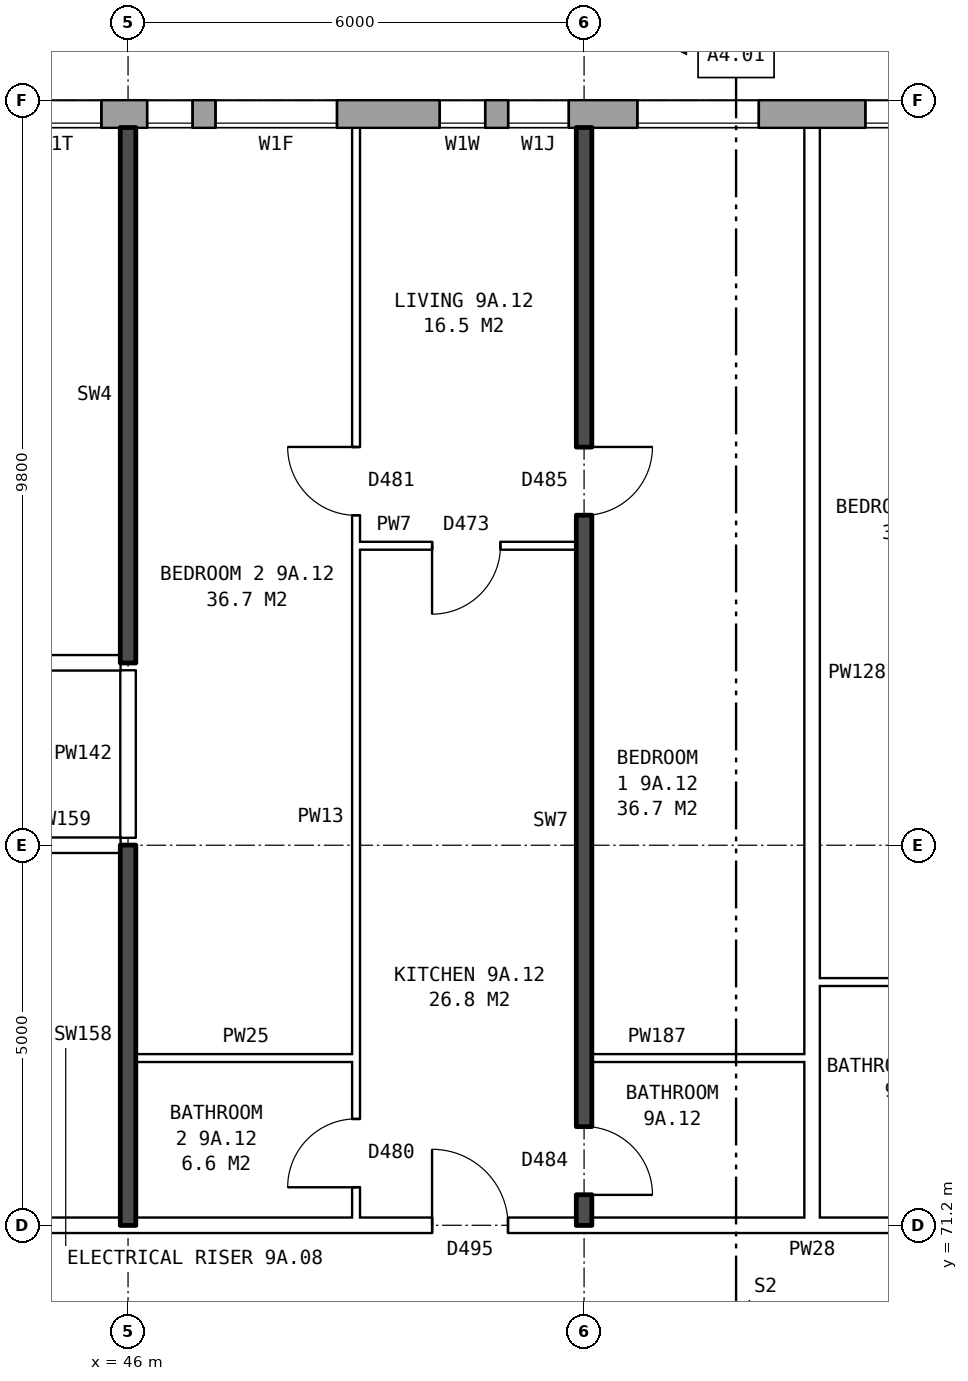
"""IFC4 building model, lengths in metres.
Left out: names, types, materials, properties, quantities, classifications, styles, units other than length and angle.
Written with IfcOpenShell. Run it as: python <this file> out.ifc"""

import sys

from ifc_helpers import new_model, si_unit, direction, frame, frame_2d, origin, place, context, subcontext, project, spatial, rectangle, extrude, element, fill, save


model = new_model("IFC4")
c1 = context("Model", 3, precision=1e-05, world=origin(), true_north=direction((0.0, 1.0)))
c2 = subcontext(c1, "Body", "Model", "MODEL_VIEW")
j1 = project(units=[si_unit("LENGTHUNIT", "METRE"), si_unit("PLANEANGLEUNIT", "RADIAN")], contexts=[c1])
p1 = place(None, origin())
s1 = spatial("IfcSite", under=j1, at=p1, CompositionType="ELEMENT")
p2 = place(p1, origin())
s2 = spatial("IfcBuilding", under=s1, at=p2, CompositionType="ELEMENT")
p3 = place(p2, frame((0.0, 0.0, 35.0)))
s3 = spatial("IfcBuildingStorey", under=s2, at=p3, CompositionType="ELEMENT", Elevation=35.0)
p4 = place(p3, frame((72.925, 85.82, 0.0), z_axis=(0.0, 0.0, 1.0), x_axis=(-1.0, 0.0, 0.0)))
e1 = element("IfcWall", 1, at=p4, inside=s3, PredefinedType="STANDARD", context=c2, shape_type="SweptSolid", body=[
    extrude(rectangle(XDim=50.101, YDim=0.36, at=frame_2d((25.05, 0.0))), origin(), (0.0, 0.0, 1.0), 2.85),
])
p5 = place(p4, frame((0.625, 0.0, 0.8)))
e2 = element("IfcOpeningElement", 2, at=p5, cuts=e1, PredefinedType="OPENING", context=c2, shape_type="SweptSolid", body=[
    extrude(rectangle(XDim=1.6, YDim=1.8, at=frame_2d((0.8, 0.9))), frame((0.0, 0.19, 0.0), z_axis=(0.0, -1.0, 0.0), x_axis=(1.0, 0.0, 0.0)), (0.0, 0.0, 1.0), 0.38),
])
p6 = place(p4, frame((3.625, 0.0, 0.8)))
e3 = element("IfcOpeningElement", 3, at=p6, cuts=e1, PredefinedType="OPENING", context=c2, shape_type="SweptSolid", body=[
    extrude(rectangle(XDim=1.6, YDim=1.8, at=frame_2d((0.8, 0.9))), frame((0.0, 0.19, 0.0), z_axis=(0.0, -1.0, 0.0), x_axis=(1.0, 0.0, 0.0)), (0.0, 0.0, 1.0), 0.38),
])
p7 = place(p4, frame((6.625, 0.0, 0.8)))
e4 = element("IfcOpeningElement", 4, at=p7, cuts=e1, PredefinedType="OPENING", context=c2, shape_type="SweptSolid", body=[
    extrude(rectangle(XDim=1.6, YDim=1.8, at=frame_2d((0.8, 0.9))), frame((0.0, 0.19, 0.0), z_axis=(0.0, -1.0, 0.0), x_axis=(1.0, 0.0, 0.0)), (0.0, 0.0, 1.0), 0.38),
])
p8 = place(p4, frame((9.625, 0.0, 0.8)))
e5 = element("IfcOpeningElement", 5, at=p8, cuts=e1, PredefinedType="OPENING", context=c2, shape_type="SweptSolid", body=[
    extrude(rectangle(XDim=1.6, YDim=1.8, at=frame_2d((0.8, 0.9))), frame((0.0, 0.19, 0.0), z_axis=(0.0, -1.0, 0.0), x_axis=(1.0, 0.0, 0.0)), (0.0, 0.0, 1.0), 0.38),
])
p9 = place(p4, frame((12.625, 0.0, 0.8)))
e6 = element("IfcOpeningElement", 6, at=p9, cuts=e1, PredefinedType="OPENING", context=c2, shape_type="SweptSolid", body=[
    extrude(rectangle(XDim=1.6, YDim=1.8, at=frame_2d((0.8, 0.9))), frame((0.0, 0.19, 0.0), z_axis=(0.0, -1.0, 0.0), x_axis=(1.0, 0.0, 0.0)), (0.0, 0.0, 1.0), 0.38),
])
p10 = place(p4, frame((15.625, 0.0, 0.8)))
e7 = element("IfcOpeningElement", 7, at=p10, cuts=e1, PredefinedType="OPENING", context=c2, shape_type="SweptSolid", body=[
    extrude(rectangle(XDim=1.6, YDim=1.8, at=frame_2d((0.8, 0.9))), frame((0.0, 0.19, 0.0), z_axis=(0.0, -1.0, 0.0), x_axis=(1.0, 0.0, 0.0)), (0.0, 0.0, 1.0), 0.38),
])
p11 = place(p4, frame((18.625, 0.0, 0.8)))
e8 = element("IfcOpeningElement", 8, at=p11, cuts=e1, PredefinedType="OPENING", context=c2, shape_type="SweptSolid", body=[
    extrude(rectangle(XDim=1.6, YDim=1.8, at=frame_2d((0.8, 0.9))), frame((0.0, 0.19, 0.0), z_axis=(0.0, -1.0, 0.0), x_axis=(1.0, 0.0, 0.0)), (0.0, 0.0, 1.0), 0.38),
])
p12 = place(p4, frame((21.125, 0.0, 1.1)))
e9 = element("IfcOpeningElement", 9, at=p12, cuts=e1, PredefinedType="OPENING", context=c2, shape_type="SweptSolid", body=[
    extrude(rectangle(XDim=0.8, YDim=1.5, at=frame_2d((0.4, 0.75))), frame((0.0, 0.19, 0.0), z_axis=(0.0, -1.0, 0.0), x_axis=(1.0, 0.0, 0.0)), (0.0, 0.0, 1.0), 0.38),
])
p13 = place(p4, frame((24.175, 0.0, 0.15)))
e10 = element("IfcOpeningElement", 10, at=p13, cuts=e1, PredefinedType="OPENING", context=c2, shape_type="SweptSolid", body=[
    extrude(rectangle(XDim=1.6, YDim=1.5, at=frame_2d((0.8, 0.75))), frame((0.0, 0.19, 0.0), z_axis=(0.0, -1.0, 0.0), x_axis=(1.0, 0.0, 0.0)), (0.0, 0.0, 1.0), 0.38),
])
p14 = place(p4, frame((27.275, 0.0, 1.7)))
e11 = element("IfcOpeningElement", 11, at=p14, cuts=e1, PredefinedType="OPENING", context=c2, shape_type="SweptSolid", body=[
    extrude(rectangle(XDim=1.2, YDim=0.9, at=frame_2d((0.6, 0.45))), frame((0.0, 0.19, 0.0), z_axis=(0.0, -1.0, 0.0), x_axis=(1.0, 0.0, 0.0)), (0.0, 0.0, 1.0), 0.38),
])
p15 = place(p4, frame((30.625, 0.0, 0.8)))
e12 = element("IfcOpeningElement", 12, at=p15, cuts=e1, PredefinedType="OPENING", context=c2, shape_type="SweptSolid", body=[
    extrude(rectangle(XDim=1.6, YDim=1.8, at=frame_2d((0.8, 0.9))), frame((0.0, 0.19, 0.0), z_axis=(0.0, -1.0, 0.0), x_axis=(1.0, 0.0, 0.0)), (0.0, 0.0, 1.0), 0.38),
])
p16 = place(p4, frame((33.625, 0.0, 0.8)))
e13 = element("IfcOpeningElement", 13, at=p16, cuts=e1, PredefinedType="OPENING", context=c2, shape_type="SweptSolid", body=[
    extrude(rectangle(XDim=1.6, YDim=1.8, at=frame_2d((0.8, 0.9))), frame((0.0, 0.19, 0.0), z_axis=(0.0, -1.0, 0.0), x_axis=(1.0, 0.0, 0.0)), (0.0, 0.0, 1.0), 0.38),
])
p17 = place(p4, frame((36.625, 0.0, 0.8)))
e14 = element("IfcOpeningElement", 14, at=p17, cuts=e1, PredefinedType="OPENING", context=c2, shape_type="SweptSolid", body=[
    extrude(rectangle(XDim=1.6, YDim=1.8, at=frame_2d((0.8, 0.9))), frame((0.0, 0.19, 0.0), z_axis=(0.0, -1.0, 0.0), x_axis=(1.0, 0.0, 0.0)), (0.0, 0.0, 1.0), 0.38),
])
p18 = place(p4, frame((39.625, 0.0, 0.8)))
e15 = element("IfcOpeningElement", 15, at=p18, cuts=e1, PredefinedType="OPENING", context=c2, shape_type="SweptSolid", body=[
    extrude(rectangle(XDim=1.6, YDim=1.8, at=frame_2d((0.8, 0.9))), frame((0.0, 0.19, 0.0), z_axis=(0.0, -1.0, 0.0), x_axis=(1.0, 0.0, 0.0)), (0.0, 0.0, 1.0), 0.38),
])
p19 = place(p4, frame((42.625, 0.0, 0.8)))
e16 = element("IfcOpeningElement", 16, at=p19, cuts=e1, PredefinedType="OPENING", context=c2, shape_type="SweptSolid", body=[
    extrude(rectangle(XDim=1.6, YDim=1.8, at=frame_2d((0.8, 0.9))), frame((0.0, 0.19, 0.0), z_axis=(0.0, -1.0, 0.0), x_axis=(1.0, 0.0, 0.0)), (0.0, 0.0, 1.0), 0.38),
])
p20 = place(p4, frame((45.625, 0.0, 0.8)))
e17 = element("IfcOpeningElement", 17, at=p20, cuts=e1, PredefinedType="OPENING", context=c2, shape_type="SweptSolid", body=[
    extrude(rectangle(XDim=1.6, YDim=1.8, at=frame_2d((0.8, 0.9))), frame((0.0, 0.19, 0.0), z_axis=(0.0, -1.0, 0.0), x_axis=(1.0, 0.0, 0.0)), (0.0, 0.0, 1.0), 0.38),
])
p21 = place(p4, frame((22.225, 0.0, 1.7)))
e18 = element("IfcOpeningElement", 18, at=p21, cuts=e1, PredefinedType="OPENING", context=c2, shape_type="SweptSolid", body=[
    extrude(rectangle(XDim=0.6, YDim=0.9, at=frame_2d((0.3, 0.45))), frame((0.0, 0.19, 0.0), z_axis=(0.0, -1.0, 0.0), x_axis=(1.0, 0.0, 0.0)), (0.0, 0.0, 1.0), 0.38),
])
p22 = place(p4, frame((26.075, 0.0, 0.25)))
e19 = element("IfcOpeningElement", 19, at=p22, cuts=e1, PredefinedType="OPENING", context=c2, shape_type="SweptSolid", body=[
    extrude(rectangle(XDim=0.6, YDim=0.9, at=frame_2d((0.3, 0.45))), frame((0.0, 0.19, 0.0), z_axis=(0.0, -1.0, 0.0), x_axis=(1.0, 0.0, 0.0)), (0.0, 0.0, 1.0), 0.38),
])
p23 = place(p4, frame((28.775, 0.0, 0.8)))
e20 = element("IfcOpeningElement", 20, at=p23, cuts=e1, PredefinedType="OPENING", context=c2, shape_type="SweptSolid", body=[
    extrude(rectangle(XDim=1.4, YDim=1.8, at=frame_2d((0.7, 0.9))), frame((0.0, 0.19, 0.0), z_axis=(0.0, -1.0, 0.0), x_axis=(1.0, 0.0, 0.0)), (0.0, 0.0, 1.0), 0.38),
])
p24 = place(p3, frame((44.36, 71.2, 0.0), z_axis=(0.0, 0.0, 1.0), x_axis=(1.0, 0.0, 0.0)))
e21 = element("IfcWall", 21, at=p24, inside=s3, PredefinedType="PARTITIONING", context=c2, shape_type="SweptSolid", body=[
    extrude(rectangle(XDim=19.28, YDim=0.2, at=frame_2d((9.64, 0.0))), origin(), (0.0, 0.0, 1.0), 2.85),
])
p25 = place(p24, frame((14.64, 0.0, 0.0)))
e22 = element("IfcOpeningElement", 22, at=p25, cuts=e21, PredefinedType="OPENING", context=c2, shape_type="SweptSolid", body=[
    extrude(rectangle(XDim=1.0, YDim=2.1, at=frame_2d((0.5, 1.05))), frame((0.0, 0.11, 0.0), z_axis=(0.0, -1.0, 0.0), x_axis=(1.0, 0.0, 0.0)), (0.0, 0.0, 1.0), 0.22),
])
p26 = place(p24, frame((5.64, 0.0, 0.0)))
e23 = element("IfcOpeningElement", 23, at=p26, cuts=e21, PredefinedType="OPENING", context=c2, shape_type="SweptSolid", body=[
    extrude(rectangle(XDim=1.0, YDim=2.1, at=frame_2d((0.5, 1.05))), frame((0.0, 0.11, 0.0), z_axis=(0.0, -1.0, 0.0), x_axis=(1.0, 0.0, 0.0)), (0.0, 0.0, 1.0), 0.22),
])
p27 = place(p3, frame((46.1, 73.4, 0.0), z_axis=(0.0, 0.0, 1.0), x_axis=(1.0, 0.0, 0.0)))
e24 = element("IfcWall", 24, at=p27, inside=s3, PredefinedType="PARTITIONING", context=c2, shape_type="SweptSolid", body=[
    extrude(rectangle(XDim=2.9, YDim=0.1, at=frame_2d((1.45, 0.0))), origin(), (0.0, 0.0, 1.0), 2.85),
])
for number, where, z_axis, x_axis in (
    (25, (52.1, 73.4, 0.0), (0.0, 0.0, 1.0), (1.0, 0.0, 0.0)),
    (26, (55.1, 74.4, 0.0), (0.0, 0.0, 1.0), (1.0, 0.0, 0.0)),
):
    element("IfcWall", number, at=place(p3, frame(where, z_axis=z_axis, x_axis=x_axis)), inside=s3, PredefinedType="PARTITIONING", context=c2, shape_type="SweptSolid", body=[
        extrude(rectangle(XDim=2.8, YDim=0.1, at=frame_2d((1.4, 0.0))), origin(), (0.0, 0.0, 1.0), 2.85),
    ])
p28 = place(p3, frame((44.36, 76.2, 0.0), z_axis=(0.0, 0.0, 1.0), x_axis=(1.0, 0.0, 0.0)))
e27 = element("IfcWall", 27, at=p28, inside=s3, PredefinedType="PARTITIONING", context=c2, shape_type="SweptSolid", body=[
    extrude(rectangle(XDim=1.54, YDim=0.2, at=frame_2d((0.77, 0.0))), origin(), (0.0, 0.0, 1.0), 2.85),
])
p29 = place(p3, frame((20.11, 78.6, 0.0), z_axis=(0.0, 0.0, 1.0), x_axis=(1.0, 0.0, 0.0)))
e28 = element("IfcWall", 28, at=p29, inside=s3, PredefinedType="PARTITIONING", context=c2, shape_type="SweptSolid", body=[
    extrude(rectangle(XDim=25.79, YDim=0.2, at=frame_2d((12.895, 0.0))), origin(), (0.0, 0.0, 1.0), 2.85),
])
p30 = place(p29, frame((22.34, 0.0, 0.0)))
e29 = element("IfcOpeningElement", 29, at=p30, cuts=e28, PredefinedType="OPENING", context=c2, shape_type="SweptSolid", body=[
    extrude(rectangle(XDim=1.0, YDim=2.1, at=frame_2d((0.5, 1.05))), frame((0.0, 0.11, 0.0), z_axis=(0.0, -1.0, 0.0), x_axis=(1.0, 0.0, 0.0)), (0.0, 0.0, 1.0), 0.22),
])
p31 = place(p29, frame((10.39, 0.0, 0.0)))
e30 = element("IfcOpeningElement", 30, at=p31, cuts=e28, PredefinedType="OPENING", context=c2, shape_type="SweptSolid", body=[
    extrude(rectangle(XDim=1.0, YDim=2.1, at=frame_2d((0.5, 1.05))), frame((0.0, 0.11, 0.0), z_axis=(0.0, -1.0, 0.0), x_axis=(1.0, 0.0, 0.0)), (0.0, 0.0, 1.0), 0.22),
])
p32 = place(p29, frame((2.245, 0.0, 0.0)))
e31 = element("IfcOpeningElement", 31, at=p32, cuts=e28, PredefinedType="OPENING", context=c2, shape_type="SweptSolid", body=[
    extrude(rectangle(XDim=1.0, YDim=2.1, at=frame_2d((0.5, 1.05))), frame((0.0, 0.11, 0.0), z_axis=(0.0, -1.0, 0.0), x_axis=(1.0, 0.0, 0.0)), (0.0, 0.0, 1.0), 0.22),
])
p33 = place(p3, frame((49.0, 80.14, 0.0), z_axis=(0.0, 0.0, 1.0), x_axis=(1.0, 0.0, 0.0)))
e32 = element("IfcWall", 32, at=p33, inside=s3, PredefinedType="PARTITIONING", context=c2, shape_type="SweptSolid", body=[
    extrude(rectangle(XDim=2.9, YDim=0.1, at=frame_2d((1.45, 0.0))), origin(), (0.0, 0.0, 1.0), 2.85),
])
p34 = place(p33, frame((1.0, 0.0, 0.0)))
e33 = element("IfcOpeningElement", 33, at=p34, cuts=e32, PredefinedType="OPENING", context=c2, shape_type="SweptSolid", body=[
    extrude(rectangle(XDim=0.9, YDim=2.1, at=frame_2d((0.45, 1.05))), frame((0.0, 0.06, 0.0), z_axis=(0.0, -1.0, 0.0), x_axis=(1.0, 0.0, 0.0)), (0.0, 0.0, 1.0), 0.12),
])
p35 = place(p3, frame((46.0, 71.2, 0.0), z_axis=(0.0, 0.0, 1.0), x_axis=(0.0, 1.0, 0.0)))
e34 = element("IfcWall", 34, at=p35, inside=s3, PredefinedType="SOLIDWALL", context=c2, shape_type="SweptSolid", body=[
    extrude(rectangle(XDim=5.0, YDim=0.2, at=frame_2d((2.5, 0.0))), origin(), (0.0, 0.0, 1.0), 2.85),
])
p36 = place(p3, frame((46.0, 76.3, 0.0), z_axis=(0.0, 0.0, 1.0), x_axis=(0.0, 1.0, 0.0)))
e35 = element("IfcWall", 35, at=p36, inside=s3, PredefinedType="PARTITIONING", context=c2, shape_type="SweptSolid", body=[
    extrude(rectangle(XDim=2.2, YDim=0.2, at=frame_2d((1.1, 0.0))), origin(), (0.0, 0.0, 1.0), 2.85),
])
p37 = place(p3, frame((46.0, 78.6, 0.0), z_axis=(0.0, 0.0, 1.0), x_axis=(0.0, 1.0, 0.0)))
e36 = element("IfcWall", 36, at=p37, inside=s3, PredefinedType="SOLIDWALL", context=c2, shape_type="SweptSolid", body=[
    extrude(rectangle(XDim=7.04, YDim=0.2, at=frame_2d((3.52, 0.0))), origin(), (0.0, 0.0, 1.0), 2.85),
])
p38 = place(p3, frame((49.0, 71.3, 0.0), z_axis=(0.0, 0.0, 1.0), x_axis=(0.0, 1.0, 0.0)))
e37 = element("IfcWall", 37, at=p38, inside=s3, PredefinedType="PARTITIONING", context=c2, shape_type="SweptSolid", body=[
    extrude(rectangle(XDim=14.34, YDim=0.1, at=frame_2d((7.17, 0.0))), origin(), (0.0, 0.0, 1.0), 2.85),
])
p39 = place(p38, frame((9.24, 0.0, 0.0)))
e38 = element("IfcOpeningElement", 38, at=p39, cuts=e37, PredefinedType="OPENING", context=c2, shape_type="SweptSolid", body=[
    extrude(rectangle(XDim=0.9, YDim=2.1, at=frame_2d((0.45, 1.05))), frame((0.0, 0.06, 0.0), z_axis=(0.0, -1.0, 0.0), x_axis=(1.0, 0.0, 0.0)), (0.0, 0.0, 1.0), 0.12),
])
p40 = place(p38, frame((0.4, 0.0, 0.0)))
e39 = element("IfcOpeningElement", 39, at=p40, cuts=e37, PredefinedType="OPENING", context=c2, shape_type="SweptSolid", body=[
    extrude(rectangle(XDim=0.9, YDim=2.1, at=frame_2d((0.45, 1.05))), frame((0.0, 0.06, 0.0), z_axis=(0.0, -1.0, 0.0), x_axis=(1.0, 0.0, 0.0)), (0.0, 0.0, 1.0), 0.12),
])
p41 = place(p3, frame((52.0, 71.2, 0.0), z_axis=(0.0, 0.0, 1.0), x_axis=(0.0, 1.0, 0.0)))
e40 = element("IfcWall", 40, at=p41, inside=s3, PredefinedType="SOLIDWALL", context=c2, shape_type="SweptSolid", body=[
    extrude(rectangle(XDim=14.44, YDim=0.2, at=frame_2d((7.22, 0.0))), origin(), (0.0, 0.0, 1.0), 2.85),
])
p42 = place(p41, frame((9.34, 0.0, 0.0)))
e41 = element("IfcOpeningElement", 41, at=p42, cuts=e40, PredefinedType="OPENING", context=c2, shape_type="SweptSolid", body=[
    extrude(rectangle(XDim=0.9, YDim=2.1, at=frame_2d((0.45, 1.05))), frame((0.0, 0.11, 0.0), z_axis=(0.0, -1.0, 0.0), x_axis=(1.0, 0.0, 0.0)), (0.0, 0.0, 1.0), 0.22),
])
p43 = place(p41, frame((0.4, 0.0, 0.0)))
e42 = element("IfcOpeningElement", 42, at=p43, cuts=e40, PredefinedType="OPENING", context=c2, shape_type="SweptSolid", body=[
    extrude(rectangle(XDim=0.9, YDim=2.1, at=frame_2d((0.45, 1.05))), frame((0.0, 0.11, 0.0), z_axis=(0.0, -1.0, 0.0), x_axis=(1.0, 0.0, 0.0)), (0.0, 0.0, 1.0), 0.22),
])
p44 = place(p3, frame((55.0, 71.3, 0.0), z_axis=(0.0, 0.0, 1.0), x_axis=(0.0, 1.0, 0.0)))
e43 = element("IfcWall", 43, at=p44, inside=s3, PredefinedType="PARTITIONING", context=c2, shape_type="SweptSolid", body=[
    extrude(rectangle(XDim=14.34, YDim=0.2, at=frame_2d((7.17, 0.0))), origin(), (0.0, 0.0, 1.0), 2.85),
])
p45 = place(p10, origin())
e44 = element("IfcWindow", 44, at=p45, inside=s3, PartitioningType="SINGLE_PANEL", PredefinedType="WINDOW", context=c2, shape_type="SweptSolid", body=[
    extrude(rectangle(XDim=1.6, YDim=1.8, at=frame_2d((0.8, 0.9))), frame((0.0, 0.15, 0.0), z_axis=(0.0, -1.0, 0.0), x_axis=(1.0, 0.0, 0.0)), (0.0, 0.0, 1.0), 0.06),
])
fill(e7, e44)
p46 = place(p11, origin())
e45 = element("IfcWindow", 45, at=p46, inside=s3, PartitioningType="SINGLE_PANEL", PredefinedType="WINDOW", context=c2, shape_type="SweptSolid", body=[
    extrude(rectangle(XDim=1.6, YDim=1.8, at=frame_2d((0.8, 0.9))), frame((0.0, 0.15, 0.0), z_axis=(0.0, -1.0, 0.0), x_axis=(1.0, 0.0, 0.0)), (0.0, 0.0, 1.0), 0.06),
])
fill(e8, e45)
p47 = place(p12, origin())
e46 = element("IfcWindow", 46, at=p47, inside=s3, PartitioningType="SINGLE_PANEL", PredefinedType="WINDOW", context=c2, shape_type="SweptSolid", body=[
    extrude(rectangle(XDim=0.8, YDim=1.5, at=frame_2d((0.4, 0.75))), frame((0.0, 0.15, 0.0), z_axis=(0.0, -1.0, 0.0), x_axis=(1.0, 0.0, 0.0)), (0.0, 0.0, 1.0), 0.06),
])
fill(e9, e46)
p48 = place(p13, origin())
e47 = element("IfcWindow", 47, at=p48, inside=s3, PartitioningType="SINGLE_PANEL", PredefinedType="WINDOW", context=c2, shape_type="SweptSolid", body=[
    extrude(rectangle(XDim=1.6, YDim=1.5, at=frame_2d((0.8, 0.75))), frame((0.0, 0.15, 0.0), z_axis=(0.0, -1.0, 0.0), x_axis=(1.0, 0.0, 0.0)), (0.0, 0.0, 1.0), 0.06),
])
fill(e10, e47)
p49 = place(p14, origin())
e48 = element("IfcWindow", 48, at=p49, inside=s3, PartitioningType="SINGLE_PANEL", PredefinedType="WINDOW", context=c2, shape_type="SweptSolid", body=[
    extrude(rectangle(XDim=1.2, YDim=0.9, at=frame_2d((0.6, 0.45))), frame((0.0, 0.15, 0.0), z_axis=(0.0, -1.0, 0.0), x_axis=(1.0, 0.0, 0.0)), (0.0, 0.0, 1.0), 0.06),
])
fill(e11, e48)
p50 = place(p42, frame((0.9, 0.0, 0.0), z_axis=(0.0, 0.0, 1.0), x_axis=(-1.0, 0.0, 0.0)))
e49 = element("IfcDoor", 49, at=p50, inside=s3, OperationType="SINGLE_SWING_LEFT", PredefinedType="DOOR", context=c2, shape_type="SweptSolid", body=[
    extrude(rectangle(XDim=0.9, YDim=2.1, at=frame_2d((0.45, 1.05))), frame((0.0, 0.025, 0.0), z_axis=(0.0, -1.0, 0.0), x_axis=(1.0, 0.0, 0.0)), (0.0, 0.0, 1.0), 0.05),
])
fill(e41, e49)
p51 = place(p39, origin())
e50 = element("IfcDoor", 50, at=p51, inside=s3, OperationType="SINGLE_SWING_RIGHT", PredefinedType="DOOR", context=c2, shape_type="SweptSolid", body=[
    extrude(rectangle(XDim=0.9, YDim=2.1, at=frame_2d((0.45, 1.05))), frame((0.0, 0.025, 0.0), z_axis=(0.0, -1.0, 0.0), x_axis=(1.0, 0.0, 0.0)), (0.0, 0.0, 1.0), 0.05),
])
fill(e38, e50)
p52 = place(p26, origin())
e51 = element("IfcDoor", 51, at=p52, inside=s3, OperationType="SINGLE_SWING_LEFT", PredefinedType="DOOR", context=c2, shape_type="SweptSolid", body=[
    extrude(rectangle(XDim=1.0, YDim=2.1, at=frame_2d((0.5, 1.05))), frame((0.0, 0.025, 0.0), z_axis=(0.0, -1.0, 0.0), x_axis=(1.0, 0.0, 0.0)), (0.0, 0.0, 1.0), 0.05),
])
fill(e23, e51)
p53 = place(p34, frame((0.9, 0.0, 0.0), z_axis=(0.0, 0.0, 1.0), x_axis=(-1.0, 0.0, 0.0)))
e52 = element("IfcDoor", 52, at=p53, inside=s3, OperationType="SINGLE_SWING_RIGHT", PredefinedType="DOOR", context=c2, shape_type="SweptSolid", body=[
    extrude(rectangle(XDim=0.9, YDim=2.1, at=frame_2d((0.45, 1.05))), frame((0.0, 0.025, 0.0), z_axis=(0.0, -1.0, 0.0), x_axis=(1.0, 0.0, 0.0)), (0.0, 0.0, 1.0), 0.05),
])
fill(e33, e52)
p54 = place(p43, frame((0.9, 0.0, 0.0), z_axis=(0.0, 0.0, 1.0), x_axis=(-1.0, 0.0, 0.0)))
e53 = element("IfcDoor", 53, at=p54, inside=s3, OperationType="SINGLE_SWING_RIGHT", PredefinedType="DOOR", context=c2, shape_type="SweptSolid", body=[
    extrude(rectangle(XDim=0.9, YDim=2.1, at=frame_2d((0.45, 1.05))), frame((0.0, 0.025, 0.0), z_axis=(0.0, -1.0, 0.0), x_axis=(1.0, 0.0, 0.0)), (0.0, 0.0, 1.0), 0.05),
])
fill(e42, e53)
p55 = place(p40, origin())
e54 = element("IfcDoor", 54, at=p55, inside=s3, OperationType="SINGLE_SWING_LEFT", PredefinedType="DOOR", context=c2, shape_type="SweptSolid", body=[
    extrude(rectangle(XDim=0.9, YDim=2.1, at=frame_2d((0.45, 1.05))), frame((0.0, 0.025, 0.0), z_axis=(0.0, -1.0, 0.0), x_axis=(1.0, 0.0, 0.0)), (0.0, 0.0, 1.0), 0.05),
])
fill(e39, e54)
p56 = place(p21, origin())
e55 = element("IfcWindow", 55, at=p56, inside=s3, PartitioningType="SINGLE_PANEL", PredefinedType="WINDOW", context=c2, shape_type="SweptSolid", body=[
    extrude(rectangle(XDim=0.6, YDim=0.9, at=frame_2d((0.3, 0.45))), frame((0.0, 0.15, 0.0), z_axis=(0.0, -1.0, 0.0), x_axis=(1.0, 0.0, 0.0)), (0.0, 0.0, 1.0), 0.06),
])
fill(e18, e55)
p57 = place(p22, origin())
e56 = element("IfcWindow", 56, at=p57, inside=s3, PartitioningType="SINGLE_PANEL", PredefinedType="WINDOW", context=c2, shape_type="SweptSolid", body=[
    extrude(rectangle(XDim=0.6, YDim=0.9, at=frame_2d((0.3, 0.45))), frame((0.0, 0.15, 0.0), z_axis=(0.0, -1.0, 0.0), x_axis=(1.0, 0.0, 0.0)), (0.0, 0.0, 1.0), 0.06),
])
fill(e19, e56)
save(model, sys.argv[1])
